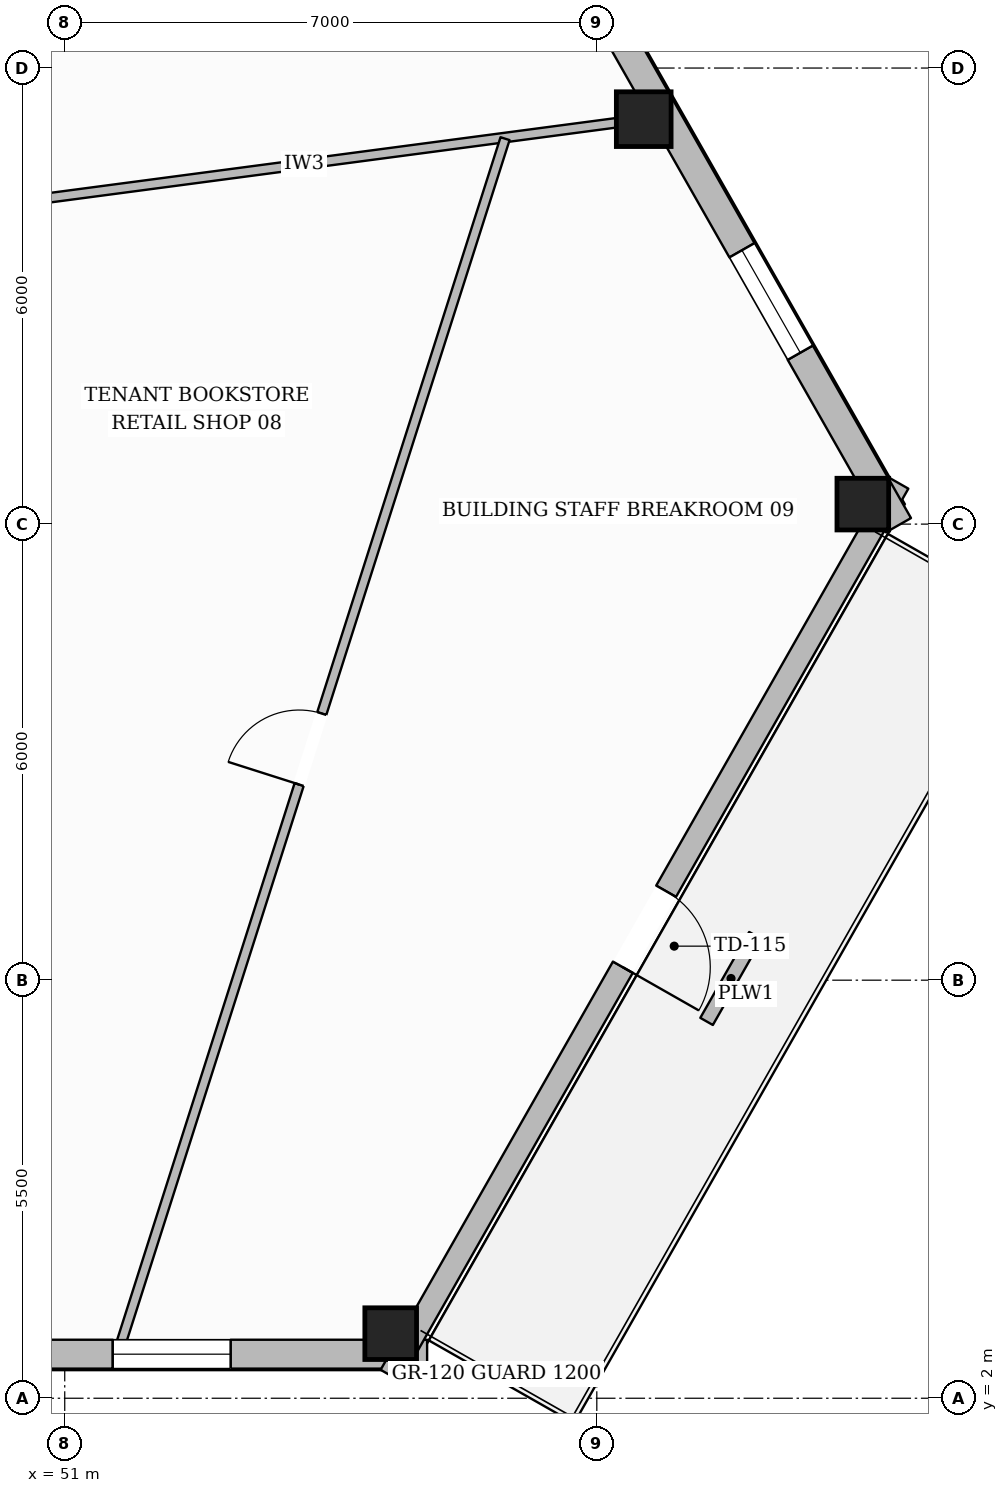
"""IFC4 building model, lengths in metres.
Left out: names, types, materials, properties, quantities, classifications, styles, units other than length and angle.
Written with IfcOpenShell. Run it as: python <this file> out.ifc"""

import sys

from ifc_helpers import new_model, si_unit, direction, frame, frame_2d, origin, origin_2d, place, context, subcontext, project, spatial, rectangle, hollow_rectangle, extrude, element, fill, save


model = new_model("IFC4")
c1 = context("Model", 3, precision=1e-05, world=origin(), true_north=direction((0.0, 1.0)))
c2 = subcontext(c1, "Body", "Model", "MODEL_VIEW")
j1 = project(units=[si_unit("LENGTHUNIT", "METRE"), si_unit("PLANEANGLEUNIT", "RADIAN")], contexts=[c1])
p1 = place(None, origin())
s1 = spatial("IfcSite", under=j1, at=p1, CompositionType="ELEMENT")
p2 = place(p1, origin())
s2 = spatial("IfcBuilding", under=s1, at=p2, CompositionType="ELEMENT")
p3 = place(p2, frame((0.0, 0.0, 93.2)))
s3 = spatial("IfcBuildingStorey", under=s2, at=p3, CompositionType="ELEMENT", Elevation=93.2)
for number, where, z_axis, x_axis in (
    (1, (55.288, 2.85, 0.0), (0.0, 0.0, 1.0), (1.0, 0.0, 0.0)),
    (2, (61.5, 13.763, 0.0), (0.0, 0.0, 1.0), (1.0, 0.0, 0.0)),
):
    element("IfcColumn", number, at=place(p3, frame(where, z_axis=z_axis, x_axis=x_axis)), inside=s3, PredefinedType="COLUMN", context=c2, shape_type="SweptSolid", body=[
        extrude(hollow_rectangle(XDim=0.68, YDim=0.68, WallThickness=0.03, at=origin_2d()), origin(), (0.0, 0.0, 1.0), 3.6),
    ])
p4 = place(p3, frame((58.617, 18.827, 0.0), z_axis=(0.0, 0.0, 1.0), x_axis=(1.0, 0.0, 0.0)))
e3 = element("IfcColumn", 3, at=p4, inside=s3, PredefinedType="COLUMN", context=c2, shape_type="SweptSolid", body=[
    extrude(hollow_rectangle(XDim=0.72, YDim=0.72, WallThickness=0.032, at=origin_2d()), origin(), (0.0, 0.0, 1.0), 3.6),
])
p5 = place(p3, frame((55.768, 2.58, 0.0), z_axis=(0.0, 0.0, 1.0), x_axis=(-1.0, 0.0, 0.0)))
e4 = element("IfcWall", 4, at=p5, inside=s3, PredefinedType="STANDARD", context=c2, shape_type="SweptSolid", body=[
    extrude(rectangle(XDim=35.535, YDim=0.38, at=frame_2d((17.768, 0.0))), origin(), (0.0, 0.0, 1.0), 3.059),
])
p6 = place(p5, frame((31.399, 0.0, 0.65)))
e5 = element("IfcOpeningElement", 5, at=p6, cuts=e4, PredefinedType="OPENING", context=c2, shape_type="SweptSolid", body=[
    extrude(rectangle(XDim=1.55, YDim=1.75, at=frame_2d((0.775, 0.875))), frame((0.0, 0.2, 0.0), z_axis=(0.0, -1.0, 0.0), x_axis=(1.0, 0.0, 0.0)), (0.0, 0.0, 1.0), 0.4),
])
p7 = place(p5, frame((25.637, 0.0, 0.65)))
e6 = element("IfcOpeningElement", 6, at=p7, cuts=e4, PredefinedType="OPENING", context=c2, shape_type="SweptSolid", body=[
    extrude(rectangle(XDim=1.55, YDim=1.75, at=frame_2d((0.775, 0.875))), frame((0.0, 0.2, 0.0), z_axis=(0.0, -1.0, 0.0), x_axis=(1.0, 0.0, 0.0)), (0.0, 0.0, 1.0), 0.4),
])
p8 = place(p5, frame((14.111, 0.0, 0.65)))
e7 = element("IfcOpeningElement", 7, at=p8, cuts=e4, PredefinedType="OPENING", context=c2, shape_type="SweptSolid", body=[
    extrude(rectangle(XDim=1.55, YDim=1.75, at=frame_2d((0.775, 0.875))), frame((0.0, 0.2, 0.0), z_axis=(0.0, -1.0, 0.0), x_axis=(1.0, 0.0, 0.0)), (0.0, 0.0, 1.0), 0.4),
])
p9 = place(p5, frame((8.348, 0.0, 0.65)))
e8 = element("IfcOpeningElement", 8, at=p9, cuts=e4, PredefinedType="OPENING", context=c2, shape_type="SweptSolid", body=[
    extrude(rectangle(XDim=1.55, YDim=1.75, at=frame_2d((0.775, 0.875))), frame((0.0, 0.2, 0.0), z_axis=(0.0, -1.0, 0.0), x_axis=(1.0, 0.0, 0.0)), (0.0, 0.0, 1.0), 0.4),
])
p10 = place(p5, frame((2.585, 0.0, 0.65)))
e9 = element("IfcOpeningElement", 9, at=p10, cuts=e4, PredefinedType="OPENING", context=c2, shape_type="SweptSolid", body=[
    extrude(rectangle(XDim=1.55, YDim=1.75, at=frame_2d((0.775, 0.875))), frame((0.0, 0.2, 0.0), z_axis=(0.0, -1.0, 0.0), x_axis=(1.0, 0.0, 0.0)), (0.0, 0.0, 1.0), 0.4),
])
p11 = place(p3, frame((61.969, 14.041, 0.0), z_axis=(0.0, 0.0, 1.0), x_axis=(-0.494645467688, -0.869094851726, 0.0)))
e10 = element("IfcWall", 10, at=p11, inside=s3, PredefinedType="STANDARD", context=c2, shape_type="SweptSolid", body=[
    extrude(rectangle(XDim=13.51, YDim=0.3, at=frame_2d((6.755, 0.0))), origin(), (0.0, 0.0, 1.0), 3.059),
])
p12 = place(p11, frame((6.18, 0.0, 0.0)))
e11 = element("IfcOpeningElement", 11, at=p12, cuts=e10, PredefinedType="OPENING", context=c2, shape_type="SweptSolid", body=[
    extrude(rectangle(XDim=1.15, YDim=2.2, at=frame_2d((0.575, 1.1))), frame((0.0, 0.16, 0.0), z_axis=(0.0, -1.0, 0.0), x_axis=(1.0, 0.0, 0.0)), (0.0, 0.0, 1.0), 0.32),
])
p13 = place(p3, frame((44.203, 44.699, 0.0), z_axis=(0.0, 0.0, 1.0), x_axis=(0.494642620698, -0.869096472084, 0.0)))
e12 = element("IfcWall", 12, at=p13, inside=s3, PredefinedType="STANDARD", context=c2, shape_type="SweptSolid", body=[
    extrude(rectangle(XDim=35.916, YDim=0.38, at=frame_2d((17.958, 0.0))), origin(), (0.0, 0.0, 1.0), 3.059),
])
p14 = place(p13, frame((31.754, 0.0, 0.65)))
e13 = element("IfcOpeningElement", 13, at=p14, cuts=e12, PredefinedType="OPENING", context=c2, shape_type="SweptSolid", body=[
    extrude(rectangle(XDim=1.55, YDim=1.75, at=frame_2d((0.775, 0.875))), frame((0.0, 0.2, 0.0), z_axis=(0.0, -1.0, 0.0), x_axis=(1.0, 0.0, 0.0)), (0.0, 0.0, 1.0), 0.4),
])
p15 = place(p13, frame((25.927, 0.0, 0.65)))
e14 = element("IfcOpeningElement", 14, at=p15, cuts=e12, PredefinedType="OPENING", context=c2, shape_type="SweptSolid", body=[
    extrude(rectangle(XDim=1.55, YDim=1.75, at=frame_2d((0.775, 0.875))), frame((0.0, 0.2, 0.0), z_axis=(0.0, -1.0, 0.0), x_axis=(1.0, 0.0, 0.0)), (0.0, 0.0, 1.0), 0.4),
])
p16 = place(p13, frame((14.272, 0.0, 0.65)))
e15 = element("IfcOpeningElement", 15, at=p16, cuts=e12, PredefinedType="OPENING", context=c2, shape_type="SweptSolid", body=[
    extrude(rectangle(XDim=1.55, YDim=1.75, at=frame_2d((0.775, 0.875))), frame((0.0, 0.2, 0.0), z_axis=(0.0, -1.0, 0.0), x_axis=(1.0, 0.0, 0.0)), (0.0, 0.0, 1.0), 0.4),
])
p17 = place(p13, frame((8.445, 0.0, 0.65)))
e16 = element("IfcOpeningElement", 16, at=p17, cuts=e12, PredefinedType="OPENING", context=c2, shape_type="SweptSolid", body=[
    extrude(rectangle(XDim=1.55, YDim=1.75, at=frame_2d((0.775, 0.875))), frame((0.0, 0.2, 0.0), z_axis=(0.0, -1.0, 0.0), x_axis=(1.0, 0.0, 0.0)), (0.0, 0.0, 1.0), 0.4),
])
p18 = place(p13, frame((2.618, 0.0, 0.65)))
e17 = element("IfcOpeningElement", 17, at=p18, cuts=e12, PredefinedType="OPENING", context=c2, shape_type="SweptSolid", body=[
    extrude(rectangle(XDim=1.55, YDim=1.75, at=frame_2d((0.775, 0.875))), frame((0.0, 0.2, 0.0), z_axis=(0.0, -1.0, 0.0), x_axis=(1.0, 0.0, 0.0)), (0.0, 0.0, 1.0), 0.4),
])
p19 = place(p3, frame((59.444, 6.958, 0.0), z_axis=(0.0, 0.0, 1.0), x_axis=(0.494864224427, 0.868970309839, 0.0)))
e18 = element("IfcWall", 18, at=p19, inside=s3, PredefinedType="USERDEFINED", context=c2, shape_type="SweptSolid", body=[
    extrude(rectangle(XDim=1.3, YDim=0.19, at=frame_2d((0.65, 0.0))), origin(), (0.0, 0.0, 1.0), 0.52),
])
p20 = place(p3, frame((50.051, 17.694, 0.0), z_axis=(0.0, 0.0, 1.0), x_axis=(0.991361202235, 0.131160080446, 0.0)))
e19 = element("IfcWall", 19, at=p20, inside=s3, PredefinedType="PARTITIONING", context=c2, shape_type="SweptSolid", body=[
    extrude(rectangle(XDim=8.27, YDim=0.125, at=frame_2d((4.135, 0.0))), origin(), (0.0, 0.0, 1.0), 3.141),
])
p21 = place(p3, frame((51.743, 2.73, 0.0), z_axis=(0.0, 0.0, 1.0), x_axis=(0.303729685162, 0.95275824759, 0.0)))
e20 = element("IfcWall", 20, at=p21, inside=s3, PredefinedType="PARTITIONING", context=c2, shape_type="SweptSolid", body=[
    extrude(rectangle(XDim=16.627, YDim=0.125, at=frame_2d((8.313, 0.0))), origin(), (0.0, 0.0, 1.0), 3.6),
])
p22 = place(p21, frame((7.709, 0.0, 0.0)))
e21 = element("IfcOpeningElement", 21, at=p22, cuts=e20, PredefinedType="OPENING", context=c2, shape_type="SweptSolid", body=[
    extrude(rectangle(XDim=0.98, YDim=2.15, at=frame_2d((0.49, 1.075))), frame((0.0, 0.073, 0.0), z_axis=(0.0, -1.0, 0.0), x_axis=(1.0, 0.0, 0.0)), (0.0, 0.0, 1.0), 0.145),
])
p23 = place(p12, origin())
e22 = element("IfcDoor", 22, at=p23, inside=s3, OperationType="SINGLE_SWING_RIGHT", PredefinedType="DOOR", context=c2, shape_type="SweptSolid", body=[
    extrude(rectangle(XDim=1.15, YDim=2.2, at=frame_2d((0.575, 1.1))), frame((0.0, 0.025, 0.0), z_axis=(0.0, -1.0, 0.0), x_axis=(1.0, 0.0, 0.0)), (0.0, 0.0, 1.0), 0.05),
])
fill(e11, e22)
p24 = place(p10, origin())
e23 = element("IfcWindow", 23, at=p24, inside=s3, PartitioningType="SINGLE_PANEL", PredefinedType="WINDOW", context=c2, shape_type="SweptSolid", body=[
    extrude(rectangle(XDim=1.55, YDim=1.75, at=frame_2d((0.775, 0.875))), frame((0.0, 0.03, 0.0), z_axis=(0.0, -1.0, 0.0), x_axis=(1.0, 0.0, 0.0)), (0.0, 0.0, 1.0), 0.06),
])
fill(e9, e23)
p25 = place(p14, origin())
e24 = element("IfcWindow", 24, at=p25, inside=s3, PartitioningType="SINGLE_PANEL", PredefinedType="WINDOW", context=c2, shape_type="SweptSolid", body=[
    extrude(rectangle(XDim=1.55, YDim=1.75, at=frame_2d((0.775, 0.875))), frame((0.0, 0.03, 0.0), z_axis=(0.0, -1.0, 0.0), x_axis=(1.0, 0.0, 0.0)), (0.0, 0.0, 1.0), 0.06),
])
fill(e13, e24)
p26 = place(p22, origin())
e25 = element("IfcDoor", 25, at=p26, inside=s3, OperationType="SINGLE_SWING_LEFT", PredefinedType="DOOR", context=c2, shape_type="SweptSolid", body=[
    extrude(rectangle(XDim=0.98, YDim=2.15, at=frame_2d((0.49, 1.075))), frame((0.0, 0.025, 0.0), z_axis=(0.0, -1.0, 0.0), x_axis=(1.0, 0.0, 0.0)), (0.0, 0.0, 1.0), 0.05),
])
fill(e21, e25)
save(model, sys.argv[1])
